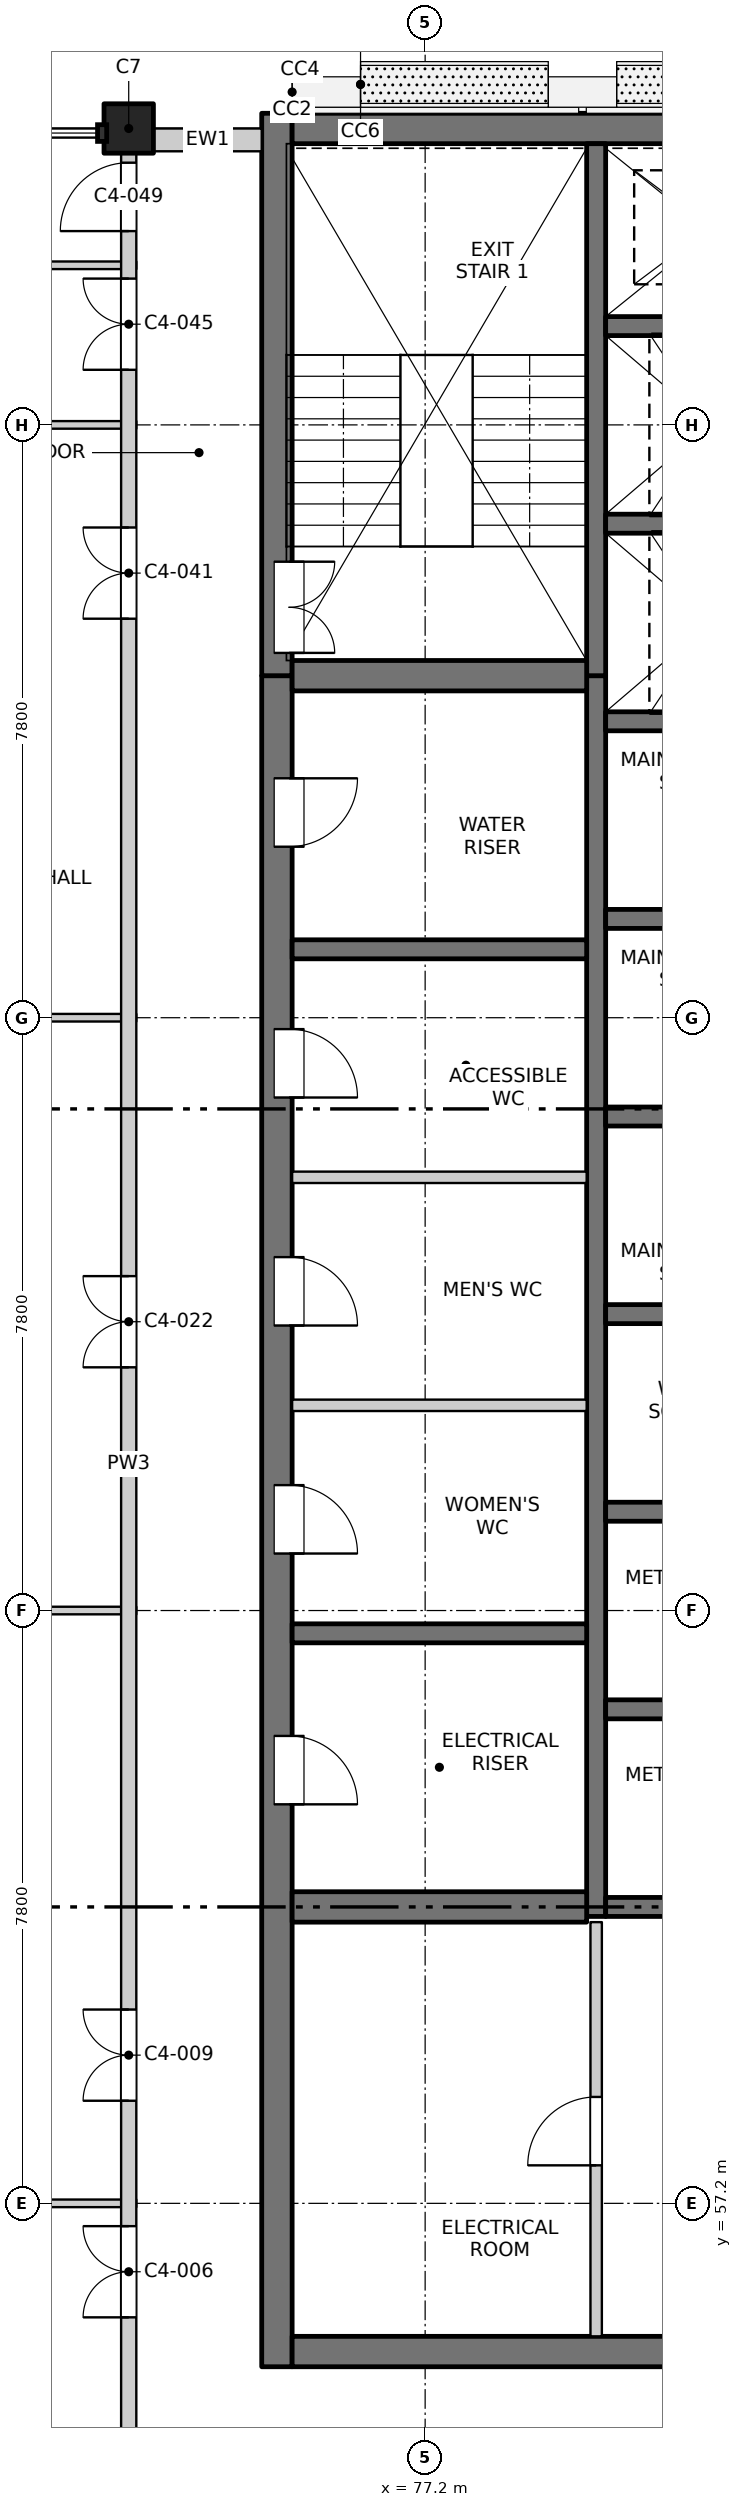
"""IFC4 building model, lengths in metres.
Left out: names, types, materials, properties, quantities, classifications, styles, units other than length and angle.
Written with IfcOpenShell. Run it as: python <this file> out.ifc"""

import sys

from ifc_helpers import new_model, si_unit, direction, frame, frame_2d, origin, origin_2d, place, context, subcontext, project, spatial, rectangle, extrude, element, fill, save


model = new_model("IFC4")
c1 = context("Model", 3, precision=1e-05, world=origin(), true_north=direction((0.0, 1.0)))
c2 = subcontext(c1, "Body", "Model", "MODEL_VIEW")
j1 = project(units=[si_unit("LENGTHUNIT", "METRE"), si_unit("PLANEANGLEUNIT", "RADIAN")], contexts=[c1])
p1 = place(None, origin())
s1 = spatial("IfcSite", under=j1, at=p1, CompositionType="ELEMENT")
p2 = place(p1, origin())
s2 = spatial("IfcBuilding", under=s1, at=p2, CompositionType="ELEMENT")
p3 = place(p2, frame((0.0, 0.0, 256.2)))
s3 = spatial("IfcBuildingStorey", under=s2, at=p3, CompositionType="ELEMENT", Elevation=256.2)
p4 = place(p3, frame((73.3, 84.5, -0.25), z_axis=(0.0, 0.0, 1.0), x_axis=(1.0, 0.0, 0.0)))
e1 = element("IfcColumn", 1, at=p4, inside=s3, PredefinedType="COLUMN", context=c2, shape_type="SweptSolid", body=[
    extrude(rectangle(XDim=0.65, YDim=0.65, at=origin_2d()), origin(), (0.0, 0.0, 1.0), 3.4),
])
p5 = place(p3, frame((75.25, 55.05, -0.25), z_axis=(0.0, 0.0, 1.0), x_axis=(0.0, 1.0, 0.0)))
e2 = element("IfcWall", 2, at=p5, inside=s3, PredefinedType="SOLIDWALL", context=c2, shape_type="SweptSolid", body=[
    extrude(rectangle(XDim=22.25, YDim=0.4, at=frame_2d((11.125, 0.0))), origin(), (0.0, 0.0, 1.0), 3.4),
])
p6 = place(p5, frame((7.4, 0.0, 0.25)))
e3 = element("IfcOpeningElement", 3, at=p6, cuts=e2, PredefinedType="OPENING", context=c2, shape_type="SweptSolid", body=[
    extrude(rectangle(XDim=0.9, YDim=2.1, at=frame_2d((0.45, 1.05))), frame((0.0, 0.21, 0.0), z_axis=(0.0, -1.0, 0.0), x_axis=(1.0, 0.0, 0.0)), (0.0, 0.0, 1.0), 0.42),
])
p7 = place(p5, frame((10.7, 0.0, 0.25)))
e4 = element("IfcOpeningElement", 4, at=p7, cuts=e2, PredefinedType="OPENING", context=c2, shape_type="SweptSolid", body=[
    extrude(rectangle(XDim=0.9, YDim=2.1, at=frame_2d((0.45, 1.05))), frame((0.0, 0.21, 0.0), z_axis=(0.0, -1.0, 0.0), x_axis=(1.0, 0.0, 0.0)), (0.0, 0.0, 1.0), 0.42),
])
p8 = place(p5, frame((13.7, 0.0, 0.25)))
e5 = element("IfcOpeningElement", 5, at=p8, cuts=e2, PredefinedType="OPENING", context=c2, shape_type="SweptSolid", body=[
    extrude(rectangle(XDim=0.9, YDim=2.1, at=frame_2d((0.45, 1.05))), frame((0.0, 0.21, 0.0), z_axis=(0.0, -1.0, 0.0), x_axis=(1.0, 0.0, 0.0)), (0.0, 0.0, 1.0), 0.42),
])
p9 = place(p5, frame((16.7, 0.0, 0.25)))
e6 = element("IfcOpeningElement", 6, at=p9, cuts=e2, PredefinedType="OPENING", context=c2, shape_type="SweptSolid", body=[
    extrude(rectangle(XDim=0.9, YDim=2.1, at=frame_2d((0.45, 1.05))), frame((0.0, 0.21, 0.0), z_axis=(0.0, -1.0, 0.0), x_axis=(1.0, 0.0, 0.0)), (0.0, 0.0, 1.0), 0.42),
])
p10 = place(p5, frame((20.0, 0.0, 0.25)))
e7 = element("IfcOpeningElement", 7, at=p10, cuts=e2, PredefinedType="OPENING", context=c2, shape_type="SweptSolid", body=[
    extrude(rectangle(XDim=0.9, YDim=2.1, at=frame_2d((0.45, 1.05))), frame((0.0, 0.21, 0.0), z_axis=(0.0, -1.0, 0.0), x_axis=(1.0, 0.0, 0.0)), (0.0, 0.0, 1.0), 0.42),
])
p11 = place(p3, frame((75.25, 77.3, -0.25), z_axis=(0.0, 0.0, 1.0), x_axis=(0.0, 1.0, 0.0)))
e8 = element("IfcWall", 8, at=p11, inside=s3, PredefinedType="SOLIDWALL", context=c2, shape_type="SweptSolid", body=[
    extrude(rectangle(XDim=7.4, YDim=0.4, at=frame_2d((3.7, 0.0))), origin(), (0.0, 0.0, 1.0), 3.4),
])
p12 = place(p11, frame((0.3, 0.0, 0.25)))
e9 = element("IfcOpeningElement", 9, at=p12, cuts=e8, PredefinedType="OPENING", context=c2, shape_type="SweptSolid", body=[
    extrude(rectangle(XDim=1.2, YDim=2.1, at=frame_2d((0.6, 1.05))), frame((0.0, 0.21, 0.0), z_axis=(0.0, -1.0, 0.0), x_axis=(1.0, 0.0, 0.0)), (0.0, 0.0, 1.0), 0.42),
])
p13 = place(p3, frame((75.45, 55.25, -0.25), z_axis=(0.0, 0.0, 1.0), x_axis=(1.0, 0.0, 0.0)))
e10 = element("IfcWall", 10, at=p13, inside=s3, PredefinedType="SOLIDWALL", context=c2, shape_type="SweptSolid", body=[
    extrude(rectangle(XDim=19.1, YDim=0.4, at=frame_2d((9.55, 0.0))), origin(), (0.0, 0.0, 1.0), 3.4),
])
p14 = place(p13, frame((8.8, 0.0, 0.25)))
e11 = element("IfcOpeningElement", 11, at=p14, cuts=e10, PredefinedType="OPENING", context=c2, shape_type="SweptSolid", body=[
    extrude(rectangle(XDim=1.5, YDim=2.1, at=frame_2d((0.75, 1.05))), frame((0.0, 0.21, 0.0), z_axis=(0.0, -1.0, 0.0), x_axis=(1.0, 0.0, 0.0)), (0.0, 0.0, 1.0), 0.42),
])
p15 = place(p3, frame((75.45, 84.5, -0.25), z_axis=(0.0, 0.0, 1.0), x_axis=(1.0, 0.0, 0.0)))
e12 = element("IfcWall", 12, at=p15, inside=s3, PredefinedType="SOLIDWALL", context=c2, shape_type="SweptSolid", body=[
    extrude(rectangle(XDim=19.1, YDim=0.4, at=frame_2d((9.55, 0.0))), origin(), (0.0, 0.0, 1.0), 3.4),
])
p16 = place(p3, frame((79.45, 60.975, -0.25), z_axis=(0.0, 0.0, 1.0), x_axis=(0.0, 1.0, 0.0)))
e13 = element("IfcWall", 13, at=p16, inside=s3, PredefinedType="SOLIDWALL", context=c2, shape_type="SweptSolid", body=[
    extrude(rectangle(XDim=16.325, YDim=0.25, at=frame_2d((8.163, 0.0))), origin(), (0.0, 0.0, 1.0), 3.4),
])
p17 = place(p3, frame((79.45, 77.3, -0.25), z_axis=(0.0, 0.0, 1.0), x_axis=(0.0, 1.0, 0.0)))
e14 = element("IfcWall", 14, at=p17, inside=s3, PredefinedType="SOLIDWALL", context=c2, shape_type="SweptSolid", body=[
    extrude(rectangle(XDim=7.0, YDim=0.25, at=frame_2d((3.5, 0.0))), origin(), (0.0, 0.0, 1.0), 3.4),
])
for number, where, z_axis, x_axis in (
    (15, (79.575, 61.1, -0.25), (0.0, 0.0, 1.0), (1.0, 0.0, 0.0)),
    (16, (79.575, 63.7, -0.25), (0.0, 0.0, 1.0), (1.0, 0.0, 0.0)),
    (17, (79.575, 66.3, -0.25), (0.0, 0.0, 1.0), (1.0, 0.0, 0.0)),
    (18, (79.575, 68.9, -0.25), (0.0, 0.0, 1.0), (1.0, 0.0, 0.0)),
    (19, (79.575, 71.5, -0.25), (0.0, 0.0, 1.0), (1.0, 0.0, 0.0)),
    (20, (79.575, 74.1, -0.25), (0.0, 0.0, 1.0), (1.0, 0.0, 0.0)),
    (21, (79.575, 76.7, -0.25), (0.0, 0.0, 1.0), (1.0, 0.0, 0.0)),
    (22, (79.575, 79.3, -0.25), (0.0, 0.0, 1.0), (1.0, 0.0, 0.0)),
    (23, (79.575, 81.9, -0.25), (0.0, 0.0, 1.0), (1.0, 0.0, 0.0)),
):
    element("IfcWall", number, at=place(p3, frame(where, z_axis=z_axis, x_axis=x_axis)), inside=s3, PredefinedType="SOLIDWALL", context=c2, shape_type="SweptSolid", body=[
        extrude(rectangle(XDim=3.0, YDim=0.25, at=frame_2d((1.5, 0.0))), origin(), (0.0, 0.0, 1.0), 3.4),
    ])
p18 = place(p3, frame((75.45, 61.1, -0.25), z_axis=(0.0, 0.0, 1.0), x_axis=(1.0, 0.0, 0.0)))
e24 = element("IfcWall", 24, at=p18, inside=s3, PredefinedType="SOLIDWALL", context=c2, shape_type="SweptSolid", body=[
    extrude(rectangle(XDim=3.875, YDim=0.4, at=frame_2d((1.938, 0.0))), origin(), (0.0, 0.0, 1.0), 3.4),
])
for number, where, z_axis, x_axis in (
    (25, (75.45, 64.7, -0.25), (0.0, 0.0, 1.0), (1.0, 0.0, 0.0)),
    (26, (75.45, 73.7, -0.25), (0.0, 0.0, 1.0), (1.0, 0.0, 0.0)),
):
    element("IfcWall", number, at=place(p3, frame(where, z_axis=z_axis, x_axis=x_axis)), inside=s3, PredefinedType="SOLIDWALL", context=c2, shape_type="SweptSolid", body=[
        extrude(rectangle(XDim=3.875, YDim=0.25, at=frame_2d((1.938, 0.0))), origin(), (0.0, 0.0, 1.0), 3.4),
    ])
p19 = place(p3, frame((75.45, 77.3, -0.25), z_axis=(0.0, 0.0, 1.0), x_axis=(1.0, 0.0, 0.0)))
e27 = element("IfcWall", 27, at=p19, inside=s3, PredefinedType="SOLIDWALL", context=c2, shape_type="SweptSolid", body=[
    extrude(rectangle(XDim=3.875, YDim=0.4, at=frame_2d((1.938, 0.0))), origin(), (0.0, 0.0, 1.0), 3.4),
])
p20 = place(p3, frame((73.625, 84.35, 0.0), z_axis=(0.0, 0.0, 1.0), x_axis=(1.0, 0.0, 0.0)))
e28 = element("IfcWall", 28, at=p20, inside=s3, PredefinedType="SOLIDWALL", context=c2, shape_type="SweptSolid", body=[
    extrude(rectangle(XDim=1.425, YDim=0.3, at=frame_2d((0.712, 0.0))), origin(), (0.0, 0.0, 1.0), 2.7),
])
for number, where, z_axis, x_axis in (
    (29, (65.635, 57.2, 0.0), (0.0, 0.0, 1.0), (1.0, 0.0, 0.0)),
    (30, (65.635, 65.0, 0.0), (0.0, 0.0, 1.0), (1.0, 0.0, 0.0)),
):
    element("IfcWall", number, at=place(p3, frame(where, z_axis=z_axis, x_axis=x_axis)), inside=s3, PredefinedType="PARTITIONING", context=c2, shape_type="SweptSolid", body=[
        extrude(rectangle(XDim=7.765, YDim=0.1, at=frame_2d((3.883, 0.0))), origin(), (0.0, 0.0, 1.0), 3.15),
    ])
for number, where, z_axis, x_axis in (
    (31, (75.45, 67.7, 0.0), (0.0, 0.0, 1.0), (1.0, 0.0, 0.0)),
    (32, (75.45, 70.7, 0.0), (0.0, 0.0, 1.0), (1.0, 0.0, 0.0)),
):
    element("IfcWall", number, at=place(p3, frame(where, z_axis=z_axis, x_axis=x_axis)), inside=s3, PredefinedType="PARTITIONING", context=c2, shape_type="SweptSolid", body=[
        extrude(rectangle(XDim=3.875, YDim=0.15, at=frame_2d((1.938, 0.0))), origin(), (0.0, 0.0, 1.0), 3.15),
    ])
p21 = place(p3, frame((65.635, 72.8, 0.0), z_axis=(0.0, 0.0, 1.0), x_axis=(1.0, 0.0, 0.0)))
e33 = element("IfcWall", 33, at=p21, inside=s3, PredefinedType="PARTITIONING", context=c2, shape_type="SweptSolid", body=[
    extrude(rectangle(XDim=7.765, YDim=0.1, at=frame_2d((3.883, 0.0))), origin(), (0.0, 0.0, 1.0), 3.15),
])
for number, where, z_axis, x_axis in (
    (34, (66.41, 80.6, 0.0), (0.0, 0.0, 1.0), (1.0, 0.0, 0.0)),
    (35, (66.41, 82.7, 0.0), (0.0, 0.0, 1.0), (1.0, 0.0, 0.0)),
):
    element("IfcWall", number, at=place(p3, frame(where, z_axis=z_axis, x_axis=x_axis)), inside=s3, PredefinedType="PARTITIONING", context=c2, shape_type="SweptSolid", body=[
        extrude(rectangle(XDim=6.99, YDim=0.1, at=frame_2d((3.495, 0.0))), origin(), (0.0, 0.0, 1.0), 3.15),
    ])
p22 = place(p3, frame((73.3, 49.5, 0.0), z_axis=(0.0, 0.0, 1.0), x_axis=(0.0, 1.0, 0.0)))
e36 = element("IfcWall", 36, at=p22, inside=s3, PredefinedType="PARTITIONING", context=c2, shape_type="SweptSolid", body=[
    extrude(rectangle(XDim=34.865, YDim=0.2, at=frame_2d((17.433, 0.0))), origin(), (0.0, 0.0, 1.0), 3.15),
])
p23 = place(p22, frame((6.2, 0.0, 0.0)))
e37 = element("IfcOpeningElement", 37, at=p23, cuts=e36, PredefinedType="OPENING", context=c2, shape_type="SweptSolid", body=[
    extrude(rectangle(XDim=1.2, YDim=2.1, at=frame_2d((0.6, 1.05))), frame((0.0, 0.11, 0.0), z_axis=(0.0, -1.0, 0.0), x_axis=(1.0, 0.0, 0.0)), (0.0, 0.0, 1.0), 0.22),
])
p24 = place(p22, frame((9.05, 0.0, 0.0)))
e38 = element("IfcOpeningElement", 38, at=p24, cuts=e36, PredefinedType="OPENING", context=c2, shape_type="SweptSolid", body=[
    extrude(rectangle(XDim=1.2, YDim=2.1, at=frame_2d((0.6, 1.05))), frame((0.0, 0.11, 0.0), z_axis=(0.0, -1.0, 0.0), x_axis=(1.0, 0.0, 0.0)), (0.0, 0.0, 1.0), 0.22),
])
p25 = place(p22, frame((18.7, 0.0, 0.0)))
e39 = element("IfcOpeningElement", 39, at=p25, cuts=e36, PredefinedType="OPENING", context=c2, shape_type="SweptSolid", body=[
    extrude(rectangle(XDim=1.2, YDim=2.1, at=frame_2d((0.6, 1.05))), frame((0.0, 0.11, 0.0), z_axis=(0.0, -1.0, 0.0), x_axis=(1.0, 0.0, 0.0)), (0.0, 0.0, 1.0), 0.22),
])
p26 = place(p22, frame((28.55, 0.0, 0.0)))
e40 = element("IfcOpeningElement", 40, at=p26, cuts=e36, PredefinedType="OPENING", context=c2, shape_type="SweptSolid", body=[
    extrude(rectangle(XDim=1.2, YDim=2.1, at=frame_2d((0.6, 1.05))), frame((0.0, 0.11, 0.0), z_axis=(0.0, -1.0, 0.0), x_axis=(1.0, 0.0, 0.0)), (0.0, 0.0, 1.0), 0.22),
])
p27 = place(p22, frame((31.825, 0.0, 0.0)))
e41 = element("IfcOpeningElement", 41, at=p27, cuts=e36, PredefinedType="OPENING", context=c2, shape_type="SweptSolid", body=[
    extrude(rectangle(XDim=1.2, YDim=2.1, at=frame_2d((0.6, 1.05))), frame((0.0, 0.11, 0.0), z_axis=(0.0, -1.0, 0.0), x_axis=(1.0, 0.0, 0.0)), (0.0, 0.0, 1.0), 0.22),
])
p28 = place(p22, frame((33.65, 0.0, 0.0)))
e42 = element("IfcOpeningElement", 42, at=p28, cuts=e36, PredefinedType="OPENING", context=c2, shape_type="SweptSolid", body=[
    extrude(rectangle(XDim=0.9, YDim=2.1, at=frame_2d((0.45, 1.05))), frame((0.0, 0.11, 0.0), z_axis=(0.0, -1.0, 0.0), x_axis=(1.0, 0.0, 0.0)), (0.0, 0.0, 1.0), 0.22),
])
p29 = place(p3, frame((79.45, 55.45, 0.0), z_axis=(0.0, 0.0, 1.0), x_axis=(0.0, 1.0, 0.0)))
e43 = element("IfcWall", 43, at=p29, inside=s3, PredefinedType="PARTITIONING", context=c2, shape_type="SweptSolid", body=[
    extrude(rectangle(XDim=5.45, YDim=0.15, at=frame_2d((2.725, 0.0))), origin(), (0.0, 0.0, 1.0), 3.15),
])
p30 = place(p29, frame((2.25, 0.0, 0.0)))
e44 = element("IfcOpeningElement", 44, at=p30, cuts=e43, PredefinedType="OPENING", context=c2, shape_type="SweptSolid", body=[
    extrude(rectangle(XDim=0.9, YDim=2.1, at=frame_2d((0.45, 1.05))), frame((0.0, 0.085, 0.0), z_axis=(0.0, -1.0, 0.0), x_axis=(1.0, 0.0, 0.0)), (0.0, 0.0, 1.0), 0.17),
])
p31 = place(p23, origin())
e45 = element("IfcDoor", 45, at=p31, inside=s3, OperationType="DOUBLE_DOOR_SINGLE_SWING", PredefinedType="DOOR", context=c2, shape_type="SweptSolid", body=[
    extrude(rectangle(XDim=1.2, YDim=2.1, at=frame_2d((0.6, 1.05))), frame((0.0, 0.025, 0.0), z_axis=(0.0, -1.0, 0.0), x_axis=(1.0, 0.0, 0.0)), (0.0, 0.0, 1.0), 0.05),
])
fill(e37, e45)
p32 = place(p30, origin())
e46 = element("IfcDoor", 46, at=p32, inside=s3, OperationType="SINGLE_SWING_LEFT", PredefinedType="DOOR", context=c2, shape_type="SweptSolid", body=[
    extrude(rectangle(XDim=0.9, YDim=2.1, at=frame_2d((0.45, 1.05))), frame((0.0, 0.025, 0.0), z_axis=(0.0, -1.0, 0.0), x_axis=(1.0, 0.0, 0.0)), (0.0, 0.0, 1.0), 0.05),
])
fill(e44, e46)
p33 = place(p24, origin())
e47 = element("IfcDoor", 47, at=p33, inside=s3, OperationType="DOUBLE_DOOR_SINGLE_SWING", PredefinedType="DOOR", context=c2, shape_type="SweptSolid", body=[
    extrude(rectangle(XDim=1.2, YDim=2.1, at=frame_2d((0.6, 1.05))), frame((0.0, 0.025, 0.0), z_axis=(0.0, -1.0, 0.0), x_axis=(1.0, 0.0, 0.0)), (0.0, 0.0, 1.0), 0.05),
])
fill(e38, e47)
p34 = place(p6, origin())
e48 = element("IfcDoor", 48, at=p34, inside=s3, OperationType="SINGLE_SWING_RIGHT", PredefinedType="DOOR", context=c2, shape_type="SweptSolid", body=[
    extrude(rectangle(XDim=0.9, YDim=2.1, at=frame_2d((0.45, 1.05))), frame((0.0, -0.135, 0.0), z_axis=(0.0, -1.0, 0.0), x_axis=(1.0, 0.0, 0.0)), (0.0, 0.0, 1.0), 0.05),
])
fill(e3, e48)
p35 = place(p7, origin())
e49 = element("IfcDoor", 49, at=p35, inside=s3, OperationType="SINGLE_SWING_RIGHT", PredefinedType="DOOR", context=c2, shape_type="SweptSolid", body=[
    extrude(rectangle(XDim=0.9, YDim=2.1, at=frame_2d((0.45, 1.05))), frame((0.0, -0.135, 0.0), z_axis=(0.0, -1.0, 0.0), x_axis=(1.0, 0.0, 0.0)), (0.0, 0.0, 1.0), 0.05),
])
fill(e4, e49)
p36 = place(p25, origin())
e50 = element("IfcDoor", 50, at=p36, inside=s3, OperationType="DOUBLE_DOOR_SINGLE_SWING", PredefinedType="DOOR", context=c2, shape_type="SweptSolid", body=[
    extrude(rectangle(XDim=1.2, YDim=2.1, at=frame_2d((0.6, 1.05))), frame((0.0, 0.025, 0.0), z_axis=(0.0, -1.0, 0.0), x_axis=(1.0, 0.0, 0.0)), (0.0, 0.0, 1.0), 0.05),
])
fill(e39, e50)
p37 = place(p8, origin())
e51 = element("IfcDoor", 51, at=p37, inside=s3, OperationType="SINGLE_SWING_RIGHT", PredefinedType="DOOR", context=c2, shape_type="SweptSolid", body=[
    extrude(rectangle(XDim=0.9, YDim=2.1, at=frame_2d((0.45, 1.05))), frame((0.0, -0.135, 0.0), z_axis=(0.0, -1.0, 0.0), x_axis=(1.0, 0.0, 0.0)), (0.0, 0.0, 1.0), 0.05),
])
fill(e5, e51)
p38 = place(p9, origin())
e52 = element("IfcDoor", 52, at=p38, inside=s3, OperationType="SINGLE_SWING_RIGHT", PredefinedType="DOOR", context=c2, shape_type="SweptSolid", body=[
    extrude(rectangle(XDim=0.9, YDim=2.1, at=frame_2d((0.45, 1.05))), frame((0.0, -0.135, 0.0), z_axis=(0.0, -1.0, 0.0), x_axis=(1.0, 0.0, 0.0)), (0.0, 0.0, 1.0), 0.05),
])
fill(e6, e52)
p39 = place(p10, origin())
e53 = element("IfcDoor", 53, at=p39, inside=s3, OperationType="SINGLE_SWING_LEFT", PredefinedType="DOOR", context=c2, shape_type="SweptSolid", body=[
    extrude(rectangle(XDim=0.9, YDim=2.1, at=frame_2d((0.45, 1.05))), frame((0.0, -0.135, 0.0), z_axis=(0.0, -1.0, 0.0), x_axis=(1.0, 0.0, 0.0)), (0.0, 0.0, 1.0), 0.05),
])
fill(e7, e53)
p40 = place(p12, origin())
e54 = element("IfcDoor", 54, at=p40, inside=s3, OperationType="DOUBLE_DOOR_SINGLE_SWING", PredefinedType="DOOR", context=c2, shape_type="SweptSolid", body=[
    extrude(rectangle(XDim=1.2, YDim=2.1, at=frame_2d((0.6, 1.05))), frame((0.0, -0.135, 0.0), z_axis=(0.0, -1.0, 0.0), x_axis=(1.0, 0.0, 0.0)), (0.0, 0.0, 1.0), 0.05),
])
fill(e9, e54)
p41 = place(p26, origin())
e55 = element("IfcDoor", 55, at=p41, inside=s3, OperationType="DOUBLE_DOOR_SINGLE_SWING", PredefinedType="DOOR", context=c2, shape_type="SweptSolid", body=[
    extrude(rectangle(XDim=1.2, YDim=2.1, at=frame_2d((0.6, 1.05))), frame((0.0, 0.025, 0.0), z_axis=(0.0, -1.0, 0.0), x_axis=(1.0, 0.0, 0.0)), (0.0, 0.0, 1.0), 0.05),
])
fill(e40, e55)
p42 = place(p27, origin())
e56 = element("IfcDoor", 56, at=p42, inside=s3, OperationType="DOUBLE_DOOR_SINGLE_SWING", PredefinedType="DOOR", context=c2, shape_type="SweptSolid", body=[
    extrude(rectangle(XDim=1.2, YDim=2.1, at=frame_2d((0.6, 1.05))), frame((0.0, 0.025, 0.0), z_axis=(0.0, -1.0, 0.0), x_axis=(1.0, 0.0, 0.0)), (0.0, 0.0, 1.0), 0.05),
])
fill(e41, e56)
p43 = place(p28, origin())
e57 = element("IfcDoor", 57, at=p43, inside=s3, OperationType="SINGLE_SWING_LEFT", PredefinedType="DOOR", context=c2, shape_type="SweptSolid", body=[
    extrude(rectangle(XDim=0.9, YDim=2.1, at=frame_2d((0.45, 1.05))), frame((0.0, 0.025, 0.0), z_axis=(0.0, -1.0, 0.0), x_axis=(1.0, 0.0, 0.0)), (0.0, 0.0, 1.0), 0.05),
])
fill(e42, e57)
save(model, sys.argv[1])
